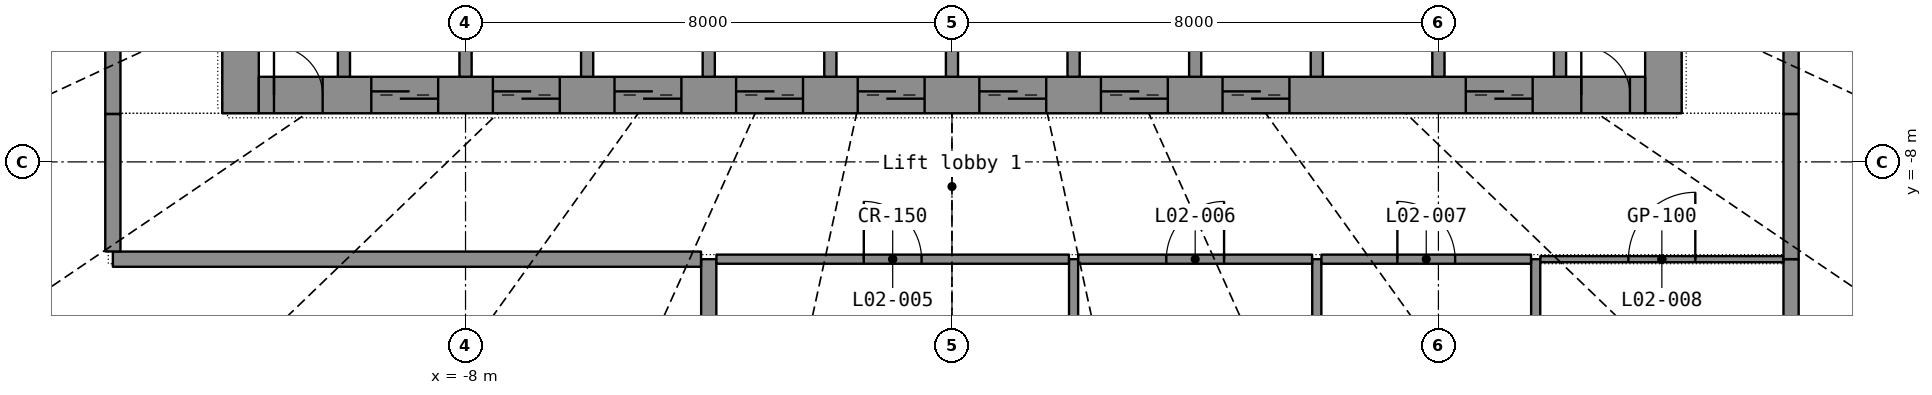
"""IFC4 building model, lengths in metres.
Left out: names, types, materials, properties, quantities, classifications, styles, units other than length and angle.
Written with IfcOpenShell. Run it as: python <this file> out.ifc"""

import sys

from ifc_helpers import new_model, si_unit, direction, frame, frame_2d, origin, place, context, subcontext, project, spatial, rectangle, extrude, element, fill, save


model = new_model("IFC4")
c1 = context("Model", 3, precision=1e-05, world=origin(), true_north=direction((0.0, 1.0)))
c2 = subcontext(c1, "Body", "Model", "MODEL_VIEW")
j1 = project(units=[si_unit("LENGTHUNIT", "METRE"), si_unit("PLANEANGLEUNIT", "RADIAN")], contexts=[c1])
p1 = place(None, origin())
s1 = spatial("IfcSite", under=j1, at=p1, CompositionType="ELEMENT")
p2 = place(p1, origin())
s2 = spatial("IfcBuilding", under=s1, at=p2, CompositionType="ELEMENT")
p3 = place(p2, frame((0.0, 0.0, 13.5)))
s3 = spatial("IfcBuildingStorey", under=s2, at=p3, CompositionType="ELEMENT", Elevation=13.5)
p4 = place(p3, frame((-11.7, -7.2, 0.0), z_axis=(0.0, 0.0, 1.0), x_axis=(0.0, 1.0, 0.0)))
e1 = element("IfcWall", 1, at=p4, inside=s3, PredefinedType="SHEAR", context=c2, shape_type="SweptSolid", body=[
    extrude(rectangle(XDim=14.4, YDim=0.6, at=frame_2d((7.2, 0.0))), origin(), (0.0, 0.0, 1.0), 6.1),
])
p5 = place(p4, frame((6.5, 0.0, 0.0)))
e2 = element("IfcOpeningElement", 2, at=p5, cuts=e1, PredefinedType="OPENING", context=c2, shape_type="SweptSolid", body=[
    extrude(rectangle(XDim=1.4, YDim=2.2, at=frame_2d((0.7, 1.1))), frame((0.0, 0.31, 0.0), z_axis=(0.0, -1.0, 0.0), x_axis=(1.0, 0.0, 0.0)), (0.0, 0.0, 1.0), 0.62),
])
p6 = place(p3, frame((11.7, -7.2, 0.0), z_axis=(0.0, 0.0, 1.0), x_axis=(0.0, 1.0, 0.0)))
e3 = element("IfcWall", 3, at=p6, inside=s3, PredefinedType="SHEAR", context=c2, shape_type="SweptSolid", body=[
    extrude(rectangle(XDim=14.4, YDim=0.6, at=frame_2d((7.2, 0.0))), origin(), (0.0, 0.0, 1.0), 6.1),
])
p7 = place(p6, frame((6.5, 0.0, 0.0)))
e4 = element("IfcOpeningElement", 4, at=p7, cuts=e3, PredefinedType="OPENING", context=c2, shape_type="SweptSolid", body=[
    extrude(rectangle(XDim=1.4, YDim=2.2, at=frame_2d((0.7, 1.1))), frame((0.0, 0.31, 0.0), z_axis=(0.0, -1.0, 0.0), x_axis=(1.0, 0.0, 0.0)), (0.0, 0.0, 1.0), 0.62),
])
p8 = place(p3, frame((-11.4, -6.9, 0.0), z_axis=(0.0, 0.0, 1.0), x_axis=(1.0, 0.0, 0.0)))
e5 = element("IfcWall", 5, at=p8, inside=s3, PredefinedType="SHEAR", context=c2, shape_type="SweptSolid", body=[
    extrude(rectangle(XDim=22.8, YDim=0.6, at=frame_2d((11.4, 0.0))), origin(), (0.0, 0.0, 1.0), 6.1),
])
p9 = place(p8, frame((1.85, 0.0, 0.0)))
e6 = element("IfcOpeningElement", 6, at=p9, cuts=e5, PredefinedType="OPENING", context=c2, shape_type="SweptSolid", body=[
    extrude(rectangle(XDim=1.1, YDim=2.2, at=frame_2d((0.55, 1.1))), frame((0.0, 0.31, 0.0), z_axis=(0.0, -1.0, 0.0), x_axis=(1.0, 0.0, 0.0)), (0.0, 0.0, 1.0), 0.62),
])
p10 = place(p8, frame((3.85, 0.0, 0.0)))
e7 = element("IfcOpeningElement", 7, at=p10, cuts=e5, PredefinedType="OPENING", context=c2, shape_type="SweptSolid", body=[
    extrude(rectangle(XDim=1.1, YDim=2.2, at=frame_2d((0.55, 1.1))), frame((0.0, 0.31, 0.0), z_axis=(0.0, -1.0, 0.0), x_axis=(1.0, 0.0, 0.0)), (0.0, 0.0, 1.0), 0.62),
])
p11 = place(p8, frame((5.85, 0.0, 0.0)))
e8 = element("IfcOpeningElement", 8, at=p11, cuts=e5, PredefinedType="OPENING", context=c2, shape_type="SweptSolid", body=[
    extrude(rectangle(XDim=1.1, YDim=2.2, at=frame_2d((0.55, 1.1))), frame((0.0, 0.31, 0.0), z_axis=(0.0, -1.0, 0.0), x_axis=(1.0, 0.0, 0.0)), (0.0, 0.0, 1.0), 0.62),
])
p12 = place(p8, frame((7.85, 0.0, 0.0)))
e9 = element("IfcOpeningElement", 9, at=p12, cuts=e5, PredefinedType="OPENING", context=c2, shape_type="SweptSolid", body=[
    extrude(rectangle(XDim=1.1, YDim=2.2, at=frame_2d((0.55, 1.1))), frame((0.0, 0.31, 0.0), z_axis=(0.0, -1.0, 0.0), x_axis=(1.0, 0.0, 0.0)), (0.0, 0.0, 1.0), 0.62),
])
p13 = place(p8, frame((9.85, 0.0, 0.0)))
e10 = element("IfcOpeningElement", 10, at=p13, cuts=e5, PredefinedType="OPENING", context=c2, shape_type="SweptSolid", body=[
    extrude(rectangle(XDim=1.1, YDim=2.2, at=frame_2d((0.55, 1.1))), frame((0.0, 0.31, 0.0), z_axis=(0.0, -1.0, 0.0), x_axis=(1.0, 0.0, 0.0)), (0.0, 0.0, 1.0), 0.62),
])
p14 = place(p8, frame((11.85, 0.0, 0.0)))
e11 = element("IfcOpeningElement", 11, at=p14, cuts=e5, PredefinedType="OPENING", context=c2, shape_type="SweptSolid", body=[
    extrude(rectangle(XDim=1.1, YDim=2.2, at=frame_2d((0.55, 1.1))), frame((0.0, 0.31, 0.0), z_axis=(0.0, -1.0, 0.0), x_axis=(1.0, 0.0, 0.0)), (0.0, 0.0, 1.0), 0.62),
])
p15 = place(p8, frame((13.85, 0.0, 0.0)))
e12 = element("IfcOpeningElement", 12, at=p15, cuts=e5, PredefinedType="OPENING", context=c2, shape_type="SweptSolid", body=[
    extrude(rectangle(XDim=1.1, YDim=2.2, at=frame_2d((0.55, 1.1))), frame((0.0, 0.31, 0.0), z_axis=(0.0, -1.0, 0.0), x_axis=(1.0, 0.0, 0.0)), (0.0, 0.0, 1.0), 0.62),
])
p16 = place(p8, frame((15.85, 0.0, 0.0)))
e13 = element("IfcOpeningElement", 13, at=p16, cuts=e5, PredefinedType="OPENING", context=c2, shape_type="SweptSolid", body=[
    extrude(rectangle(XDim=1.1, YDim=2.2, at=frame_2d((0.55, 1.1))), frame((0.0, 0.31, 0.0), z_axis=(0.0, -1.0, 0.0), x_axis=(1.0, 0.0, 0.0)), (0.0, 0.0, 1.0), 0.62),
])
p17 = place(p8, frame((19.85, 0.0, 0.0)))
e14 = element("IfcOpeningElement", 14, at=p17, cuts=e5, PredefinedType="OPENING", context=c2, shape_type="SweptSolid", body=[
    extrude(rectangle(XDim=1.1, YDim=2.2, at=frame_2d((0.55, 1.1))), frame((0.0, 0.31, 0.0), z_axis=(0.0, -1.0, 0.0), x_axis=(1.0, 0.0, 0.0)), (0.0, 0.0, 1.0), 0.62),
])
p18 = place(p8, frame((0.25, 0.0, 0.0)))
e15 = element("IfcOpeningElement", 15, at=p18, cuts=e5, PredefinedType="OPENING", context=c2, shape_type="SweptSolid", body=[
    extrude(rectangle(XDim=0.8, YDim=2.05, at=frame_2d((0.4, 1.025))), frame((0.0, 0.31, 0.0), z_axis=(0.0, -1.0, 0.0), x_axis=(1.0, 0.0, 0.0)), (0.0, 0.0, 1.0), 0.62),
])
p19 = place(p8, frame((21.75, 0.0, 0.0)))
e16 = element("IfcOpeningElement", 16, at=p19, cuts=e5, PredefinedType="OPENING", context=c2, shape_type="SweptSolid", body=[
    extrude(rectangle(XDim=0.8, YDim=2.05, at=frame_2d((0.4, 1.025))), frame((0.0, 0.31, 0.0), z_axis=(0.0, -1.0, 0.0), x_axis=(1.0, 0.0, 0.0)), (0.0, 0.0, 1.0), 0.62),
])
for number, where, z_axis, x_axis in (
    (17, (-10.0, -6.6, 0.0), (0.0, 0.0, 1.0), (0.0, 1.0, 0.0)),
    (18, (-8.0, -6.6, 0.0), (0.0, 0.0, 1.0), (0.0, 1.0, 0.0)),
    (19, (-6.0, -6.6, 0.0), (0.0, 0.0, 1.0), (0.0, 1.0, 0.0)),
    (20, (-4.0, -6.6, 0.0), (0.0, 0.0, 1.0), (0.0, 1.0, 0.0)),
    (21, (-2.0, -6.6, 0.0), (0.0, 0.0, 1.0), (0.0, 1.0, 0.0)),
    (22, (0.0, -6.6, 0.0), (0.0, 0.0, 1.0), (0.0, 1.0, 0.0)),
    (23, (2.0, -6.6, 0.0), (0.0, 0.0, 1.0), (0.0, 1.0, 0.0)),
    (24, (4.0, -6.6, 0.0), (0.0, 0.0, 1.0), (0.0, 1.0, 0.0)),
    (25, (6.0, -6.6, 0.0), (0.0, 0.0, 1.0), (0.0, 1.0, 0.0)),
    (26, (8.0, -6.6, 0.0), (0.0, 0.0, 1.0), (0.0, 1.0, 0.0)),
    (27, (10.0, -6.6, 0.0), (0.0, 0.0, 1.0), (0.0, 1.0, 0.0)),
):
    element("IfcWall", number, at=place(p3, frame(where, z_axis=z_axis, x_axis=x_axis)), inside=s3, PredefinedType="SHEAR", context=c2, shape_type="SweptSolid", body=[
        extrude(rectangle(XDim=2.7, YDim=0.2, at=frame_2d((1.35, 0.0))), origin(), (0.0, 0.0, 1.0), 6.1),
    ])
p20 = place(p3, frame((2.0, -23.6, 0.0), z_axis=(0.0, 0.0, 1.0), x_axis=(0.0, 1.0, 0.0)))
e28 = element("IfcWall", 28, at=p20, inside=s3, PredefinedType="PARTITIONING", context=c2, shape_type="SweptSolid", body=[
    extrude(rectangle(XDim=14.0, YDim=0.15, at=frame_2d((7.0, 0.0))), origin(), (0.0, 0.0, 1.0), 5.1),
])
p21 = place(p3, frame((-4.0, -23.446, 0.0), z_axis=(0.0, 0.0, 1.0), x_axis=(0.0, 1.0, 0.0)))
e29 = element("IfcWall", 29, at=p21, inside=s3, PredefinedType="PARTITIONING", context=c2, shape_type="SweptSolid", body=[
    extrude(rectangle(XDim=13.846, YDim=0.25, at=frame_2d((6.923, 0.0))), origin(), (0.0, 0.0, 1.0), 5.1),
])
p22 = place(p3, frame((6.0, -23.169, 0.0), z_axis=(0.0, 0.0, 1.0), x_axis=(0.0, 1.0, 0.0)))
e30 = element("IfcWall", 30, at=p22, inside=s3, PredefinedType="PARTITIONING", context=c2, shape_type="SweptSolid", body=[
    extrude(rectangle(XDim=13.569, YDim=0.15, at=frame_2d((6.784, 0.0))), origin(), (0.0, 0.0, 1.0), 5.1),
])
p23 = place(p3, frame((9.6, -22.303, 0.0), z_axis=(0.0, 0.0, 1.0), x_axis=(0.0, 1.0, 0.0)))
e31 = element("IfcWall", 31, at=p23, inside=s3, PredefinedType="PARTITIONING", context=c2, shape_type="SweptSolid", body=[
    extrude(rectangle(XDim=12.703, YDim=0.15, at=frame_2d((6.351, 0.0))), origin(), (0.0, 0.0, 1.0), 5.1),
])
p24 = place(p3, frame((13.8, -9.6, 0.0), z_axis=(0.0, 0.0, 1.0), x_axis=(0.0, -1.0, 0.0)))
e32 = element("IfcWall", 32, at=p24, inside=s3, PredefinedType="PARTITIONING", context=c2, shape_type="SweptSolid", body=[
    extrude(rectangle(XDim=11.278, YDim=0.25, at=frame_2d((5.639, 0.0))), origin(), (0.0, 0.0, 1.0), 5.1),
])
p25 = place(p3, frame((-13.8, -9.6, 0.0), z_axis=(0.0, 0.0, 1.0), x_axis=(1.0, 0.0, 0.0)))
e33 = element("IfcWall", 33, at=p25, inside=s3, PredefinedType="PARTITIONING", context=c2, shape_type="SweptSolid", body=[
    extrude(rectangle(XDim=9.673, YDim=0.25, at=frame_2d((4.836, 0.0))), origin(), (0.0, 0.0, 1.0), 5.1),
])
p26 = place(p3, frame((-3.873, -9.6, 0.0), z_axis=(0.0, 0.0, 1.0), x_axis=(1.0, 0.0, 0.0)))
e34 = element("IfcWall", 34, at=p26, inside=s3, PredefinedType="PARTITIONING", context=c2, shape_type="SweptSolid", body=[
    extrude(rectangle(XDim=5.796, YDim=0.15, at=frame_2d((2.898, 0.0))), origin(), (0.0, 0.0, 1.0), 5.1),
])
p27 = place(p26, frame((2.423, 0.0, 0.0)))
e35 = element("IfcOpeningElement", 35, at=p27, cuts=e34, PredefinedType="OPENING", context=c2, shape_type="SweptSolid", body=[
    extrude(rectangle(XDim=0.95, YDim=2.15, at=frame_2d((0.475, 1.075))), frame((0.0, 0.085, 0.0), z_axis=(0.0, -1.0, 0.0), x_axis=(1.0, 0.0, 0.0)), (0.0, 0.0, 1.0), 0.17),
])
for number, where, z_axis, x_axis in (
    (36, (-13.8, -3.0, 0.0), (0.0, 0.0, 1.0), (0.0, -1.0, 0.0)),
    (37, (13.8, -7.212, 0.0), (0.0, 0.0, 1.0), (0.0, 1.0, 0.0)),
):
    element("IfcWall", number, at=place(p3, frame(where, z_axis=z_axis, x_axis=x_axis)), inside=s3, PredefinedType="PARTITIONING", context=c2, shape_type="SweptSolid", body=[
        extrude(rectangle(XDim=4.212, YDim=0.25, at=frame_2d((2.106, 0.0))), origin(), (0.0, 0.0, 1.0), 5.1),
    ])
p28 = place(p3, frame((9.677, -9.6, 0.0), z_axis=(0.0, 0.0, 1.0), x_axis=(1.0, 0.0, 0.0)))
e38 = element("IfcWall", 38, at=p28, inside=s3, PredefinedType="PARTITIONING", context=c2, shape_type="SweptSolid", body=[
    extrude(rectangle(XDim=3.996, YDim=0.1, at=frame_2d((1.998, 0.0))), origin(), (0.0, 0.0, 1.0), 5.1),
])
p29 = place(p28, frame((1.448, 0.0, 0.0)))
e39 = element("IfcOpeningElement", 39, at=p29, cuts=e38, PredefinedType="OPENING", context=c2, shape_type="SweptSolid", body=[
    extrude(rectangle(XDim=1.1, YDim=2.2, at=frame_2d((0.55, 1.1))), frame((0.0, 0.06, 0.0), z_axis=(0.0, -1.0, 0.0), x_axis=(1.0, 0.0, 0.0)), (0.0, 0.0, 1.0), 0.12),
])
p30 = place(p3, frame((2.077, -9.6, 0.0), z_axis=(0.0, 0.0, 1.0), x_axis=(1.0, 0.0, 0.0)))
e40 = element("IfcWall", 40, at=p30, inside=s3, PredefinedType="PARTITIONING", context=c2, shape_type="SweptSolid", body=[
    extrude(rectangle(XDim=3.846, YDim=0.15, at=frame_2d((1.923, 0.0))), origin(), (0.0, 0.0, 1.0), 5.1),
])
p31 = place(p30, frame((1.448, 0.0, 0.0)))
e41 = element("IfcOpeningElement", 41, at=p31, cuts=e40, PredefinedType="OPENING", context=c2, shape_type="SweptSolid", body=[
    extrude(rectangle(XDim=0.95, YDim=2.15, at=frame_2d((0.475, 1.075))), frame((0.0, 0.085, 0.0), z_axis=(0.0, -1.0, 0.0), x_axis=(1.0, 0.0, 0.0)), (0.0, 0.0, 1.0), 0.17),
])
p32 = place(p3, frame((6.077, -9.6, 0.0), z_axis=(0.0, 0.0, 1.0), x_axis=(1.0, 0.0, 0.0)))
e42 = element("IfcWall", 42, at=p32, inside=s3, PredefinedType="PARTITIONING", context=c2, shape_type="SweptSolid", body=[
    extrude(rectangle(XDim=3.446, YDim=0.15, at=frame_2d((1.723, 0.0))), origin(), (0.0, 0.0, 1.0), 5.1),
])
p33 = place(p32, frame((1.248, 0.0, 0.0)))
e43 = element("IfcOpeningElement", 43, at=p33, cuts=e42, PredefinedType="OPENING", context=c2, shape_type="SweptSolid", body=[
    extrude(rectangle(XDim=0.95, YDim=2.15, at=frame_2d((0.475, 1.075))), frame((0.0, 0.085, 0.0), z_axis=(0.0, -1.0, 0.0), x_axis=(1.0, 0.0, 0.0)), (0.0, 0.0, 1.0), 0.17),
])
p34 = place(p3, frame((13.8, -9.599, 0.0), z_axis=(0.0, 0.0, 1.0), x_axis=(0.0, 1.0, 0.0)))
e44 = element("IfcWall", 44, at=p34, inside=s3, PredefinedType="PARTITIONING", context=c2, shape_type="SweptSolid", body=[
    extrude(rectangle(XDim=2.386, YDim=0.25, at=frame_2d((1.193, 0.0))), origin(), (0.0, 0.0, 1.0), 5.1),
])
p35 = place(p3, frame((-13.8, -7.213, 0.0), z_axis=(0.0, 0.0, 1.0), x_axis=(0.0, -1.0, 0.0)))
e45 = element("IfcWall", 45, at=p35, inside=s3, PredefinedType="PARTITIONING", context=c2, shape_type="SweptSolid", body=[
    extrude(rectangle(XDim=2.26, YDim=0.25, at=frame_2d((1.13, 0.0))), origin(), (0.0, 0.0, 1.0), 5.1),
])
p36 = place(p9, origin())
e46 = element("IfcDoor", 46, at=p36, inside=s3, OperationType="DOUBLE_DOOR_SLIDING", PredefinedType="DOOR", context=c2, shape_type="SweptSolid", body=[
    extrude(rectangle(XDim=1.1, YDim=2.2, at=frame_2d((0.55, 1.1))), frame((0.0, 0.025, 0.0), z_axis=(0.0, -1.0, 0.0), x_axis=(1.0, 0.0, 0.0)), (0.0, 0.0, 1.0), 0.05),
])
fill(e6, e46)
p37 = place(p10, origin())
e47 = element("IfcDoor", 47, at=p37, inside=s3, OperationType="DOUBLE_DOOR_SLIDING", PredefinedType="DOOR", context=c2, shape_type="SweptSolid", body=[
    extrude(rectangle(XDim=1.1, YDim=2.2, at=frame_2d((0.55, 1.1))), frame((0.0, 0.025, 0.0), z_axis=(0.0, -1.0, 0.0), x_axis=(1.0, 0.0, 0.0)), (0.0, 0.0, 1.0), 0.05),
])
fill(e7, e47)
p38 = place(p11, origin())
e48 = element("IfcDoor", 48, at=p38, inside=s3, OperationType="DOUBLE_DOOR_SLIDING", PredefinedType="DOOR", context=c2, shape_type="SweptSolid", body=[
    extrude(rectangle(XDim=1.1, YDim=2.2, at=frame_2d((0.55, 1.1))), frame((0.0, 0.025, 0.0), z_axis=(0.0, -1.0, 0.0), x_axis=(1.0, 0.0, 0.0)), (0.0, 0.0, 1.0), 0.05),
])
fill(e8, e48)
p39 = place(p12, origin())
e49 = element("IfcDoor", 49, at=p39, inside=s3, OperationType="DOUBLE_DOOR_SLIDING", PredefinedType="DOOR", context=c2, shape_type="SweptSolid", body=[
    extrude(rectangle(XDim=1.1, YDim=2.2, at=frame_2d((0.55, 1.1))), frame((0.0, 0.025, 0.0), z_axis=(0.0, -1.0, 0.0), x_axis=(1.0, 0.0, 0.0)), (0.0, 0.0, 1.0), 0.05),
])
fill(e9, e49)
p40 = place(p13, origin())
e50 = element("IfcDoor", 50, at=p40, inside=s3, OperationType="DOUBLE_DOOR_SLIDING", PredefinedType="DOOR", context=c2, shape_type="SweptSolid", body=[
    extrude(rectangle(XDim=1.1, YDim=2.2, at=frame_2d((0.55, 1.1))), frame((0.0, 0.025, 0.0), z_axis=(0.0, -1.0, 0.0), x_axis=(1.0, 0.0, 0.0)), (0.0, 0.0, 1.0), 0.05),
])
fill(e10, e50)
p41 = place(p14, origin())
e51 = element("IfcDoor", 51, at=p41, inside=s3, OperationType="DOUBLE_DOOR_SLIDING", PredefinedType="DOOR", context=c2, shape_type="SweptSolid", body=[
    extrude(rectangle(XDim=1.1, YDim=2.2, at=frame_2d((0.55, 1.1))), frame((0.0, 0.025, 0.0), z_axis=(0.0, -1.0, 0.0), x_axis=(1.0, 0.0, 0.0)), (0.0, 0.0, 1.0), 0.05),
])
fill(e11, e51)
p42 = place(p15, origin())
e52 = element("IfcDoor", 52, at=p42, inside=s3, OperationType="DOUBLE_DOOR_SLIDING", PredefinedType="DOOR", context=c2, shape_type="SweptSolid", body=[
    extrude(rectangle(XDim=1.1, YDim=2.2, at=frame_2d((0.55, 1.1))), frame((0.0, 0.025, 0.0), z_axis=(0.0, -1.0, 0.0), x_axis=(1.0, 0.0, 0.0)), (0.0, 0.0, 1.0), 0.05),
])
fill(e12, e52)
p43 = place(p16, origin())
e53 = element("IfcDoor", 53, at=p43, inside=s3, OperationType="DOUBLE_DOOR_SLIDING", PredefinedType="DOOR", context=c2, shape_type="SweptSolid", body=[
    extrude(rectangle(XDim=1.1, YDim=2.2, at=frame_2d((0.55, 1.1))), frame((0.0, 0.025, 0.0), z_axis=(0.0, -1.0, 0.0), x_axis=(1.0, 0.0, 0.0)), (0.0, 0.0, 1.0), 0.05),
])
fill(e13, e53)
p44 = place(p17, origin())
e54 = element("IfcDoor", 54, at=p44, inside=s3, OperationType="DOUBLE_DOOR_SLIDING", PredefinedType="DOOR", context=c2, shape_type="SweptSolid", body=[
    extrude(rectangle(XDim=1.1, YDim=2.2, at=frame_2d((0.55, 1.1))), frame((0.0, 0.025, 0.0), z_axis=(0.0, -1.0, 0.0), x_axis=(1.0, 0.0, 0.0)), (0.0, 0.0, 1.0), 0.05),
])
fill(e14, e54)
p45 = place(p18, origin())
e55 = element("IfcDoor", 55, at=p45, inside=s3, OperationType="SINGLE_SWING_LEFT", PredefinedType="DOOR", context=c2, shape_type="SweptSolid", body=[
    extrude(rectangle(XDim=0.8, YDim=2.05, at=frame_2d((0.4, 1.025))), frame((0.0, 0.025, 0.0), z_axis=(0.0, -1.0, 0.0), x_axis=(1.0, 0.0, 0.0)), (0.0, 0.0, 1.0), 0.05),
])
fill(e15, e55)
p46 = place(p19, origin())
e56 = element("IfcDoor", 56, at=p46, inside=s3, OperationType="SINGLE_SWING_LEFT", PredefinedType="DOOR", context=c2, shape_type="SweptSolid", body=[
    extrude(rectangle(XDim=0.8, YDim=2.05, at=frame_2d((0.4, 1.025))), frame((0.0, 0.025, 0.0), z_axis=(0.0, -1.0, 0.0), x_axis=(1.0, 0.0, 0.0)), (0.0, 0.0, 1.0), 0.05),
])
fill(e16, e56)
p47 = place(p27, origin())
e57 = element("IfcDoor", 57, at=p47, inside=s3, OperationType="SINGLE_SWING_LEFT", PredefinedType="DOOR", context=c2, shape_type="SweptSolid", body=[
    extrude(rectangle(XDim=0.95, YDim=2.15, at=frame_2d((0.475, 1.075))), frame((0.0, 0.025, 0.0), z_axis=(0.0, -1.0, 0.0), x_axis=(1.0, 0.0, 0.0)), (0.0, 0.0, 1.0), 0.05),
])
fill(e35, e57)
p48 = place(p31, origin())
e58 = element("IfcDoor", 58, at=p48, inside=s3, OperationType="SINGLE_SWING_RIGHT", PredefinedType="DOOR", context=c2, shape_type="SweptSolid", body=[
    extrude(rectangle(XDim=0.95, YDim=2.15, at=frame_2d((0.475, 1.075))), frame((0.0, 0.025, 0.0), z_axis=(0.0, -1.0, 0.0), x_axis=(1.0, 0.0, 0.0)), (0.0, 0.0, 1.0), 0.05),
])
fill(e41, e58)
p49 = place(p33, origin())
e59 = element("IfcDoor", 59, at=p49, inside=s3, OperationType="SINGLE_SWING_LEFT", PredefinedType="DOOR", context=c2, shape_type="SweptSolid", body=[
    extrude(rectangle(XDim=0.95, YDim=2.15, at=frame_2d((0.475, 1.075))), frame((0.0, 0.025, 0.0), z_axis=(0.0, -1.0, 0.0), x_axis=(1.0, 0.0, 0.0)), (0.0, 0.0, 1.0), 0.05),
])
fill(e43, e59)
p50 = place(p29, origin())
e60 = element("IfcDoor", 60, at=p50, inside=s3, OperationType="SINGLE_SWING_RIGHT", PredefinedType="DOOR", context=c2, shape_type="SweptSolid", body=[
    extrude(rectangle(XDim=1.1, YDim=2.2, at=frame_2d((0.55, 1.1))), frame((0.0, 0.025, 0.0), z_axis=(0.0, -1.0, 0.0), x_axis=(1.0, 0.0, 0.0)), (0.0, 0.0, 1.0), 0.05),
])
fill(e39, e60)
save(model, sys.argv[1])
